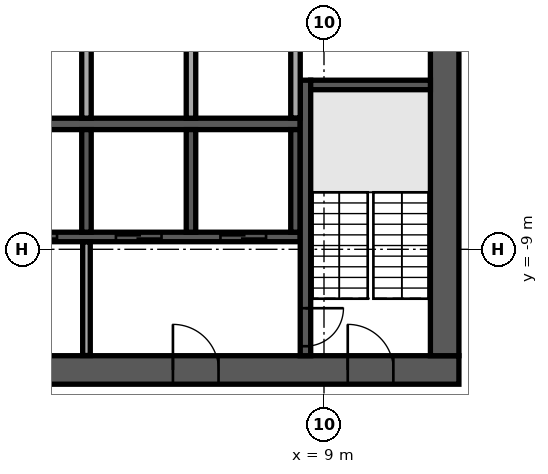
"""IFC4 building model, lengths in metres.
Left out: names, types, materials, properties, quantities, classifications, styles, units other than length and angle.
Written with IfcOpenShell. Run it as: python <this file> out.ifc"""

import sys

from ifc_helpers import new_model, si_unit, direction, frame, frame_2d, origin, place, context, subcontext, project, spatial, rectangle, extrude, element, fill, save


model = new_model("IFC4")
c1 = context("Model", 3, precision=1e-05, world=origin(), true_north=direction((0.0, 1.0)))
c2 = subcontext(c1, "Body", "Model", "MODEL_VIEW")
j1 = project(units=[si_unit("LENGTHUNIT", "METRE"), si_unit("PLANEANGLEUNIT", "RADIAN")], contexts=[c1])
p1 = place(None, origin())
s1 = spatial("IfcSite", under=j1, at=p1, CompositionType="ELEMENT")
p2 = place(p1, origin())
s2 = spatial("IfcBuilding", under=s1, at=p2, CompositionType="ELEMENT")
p3 = place(p2, frame((0.0, 0.0, 254.9)))
s3 = spatial("IfcBuildingStorey", under=s2, at=p3, CompositionType="ELEMENT", Elevation=254.9)
p4 = place(p3, frame((-12.55, -12.175, 0.0), z_axis=(0.0, 0.0, 1.0), x_axis=(1.0, 0.0, 0.0)))
e1 = element("IfcWall", 1, at=p4, inside=s3, PredefinedType="SHEAR", context=c2, shape_type="SweptSolid", body=[
    extrude(rectangle(XDim=25.1, YDim=0.75, at=frame_2d((12.55, 0.0))), origin(), (0.0, 0.0, 1.0), 3.64),
])
p5 = place(p4, frame((7.45, 0.0, 0.0)))
e2 = element("IfcOpeningElement", 2, at=p5, cuts=e1, PredefinedType="OPENING", context=c2, shape_type="SweptSolid", body=[
    extrude(rectangle(XDim=2.0, YDim=2.1, at=frame_2d((1.0, 1.05))), frame((0.0, 0.385, 0.0), z_axis=(0.0, -1.0, 0.0), x_axis=(1.0, 0.0, 0.0)), (0.0, 0.0, 1.0), 0.77),
])
p6 = place(p4, frame((17.575, 0.0, 0.0)))
e3 = element("IfcOpeningElement", 3, at=p6, cuts=e1, PredefinedType="OPENING", context=c2, shape_type="SweptSolid", body=[
    extrude(rectangle(XDim=1.2, YDim=2.1, at=frame_2d((0.6, 1.05))), frame((0.0, 0.385, 0.0), z_axis=(0.0, -1.0, 0.0), x_axis=(1.0, 0.0, 0.0)), (0.0, 0.0, 1.0), 0.77),
])
p7 = place(p4, frame((1.725, 0.0, 0.0)))
e4 = element("IfcOpeningElement", 4, at=p7, cuts=e1, PredefinedType="OPENING", context=c2, shape_type="SweptSolid", body=[
    extrude(rectangle(XDim=1.2, YDim=2.1, at=frame_2d((0.6, 1.05))), frame((0.0, 0.385, 0.0), z_axis=(0.0, -1.0, 0.0), x_axis=(1.0, 0.0, 0.0)), (0.0, 0.0, 1.0), 0.77),
])
p8 = place(p4, frame((22.175, 0.0, 0.0)))
e5 = element("IfcOpeningElement", 5, at=p8, cuts=e1, PredefinedType="OPENING", context=c2, shape_type="SweptSolid", body=[
    extrude(rectangle(XDim=1.2, YDim=2.1, at=frame_2d((0.6, 1.05))), frame((0.0, 0.385, 0.0), z_axis=(0.0, -1.0, 0.0), x_axis=(1.0, 0.0, 0.0)), (0.0, 0.0, 1.0), 0.77),
])
p9 = place(p3, frame((12.175, -11.8, 0.0), z_axis=(0.0, 0.0, 1.0), x_axis=(0.0, 1.0, 0.0)))
e6 = element("IfcWall", 6, at=p9, inside=s3, PredefinedType="SHEAR", context=c2, shape_type="SweptSolid", body=[
    extrude(rectangle(XDim=23.6, YDim=0.75, at=frame_2d((11.8, 0.0))), origin(), (0.0, 0.0, 1.0), 3.64),
])
p10 = place(p9, frame((10.6, 0.0, 0.0)))
e7 = element("IfcOpeningElement", 7, at=p10, cuts=e6, PredefinedType="OPENING", context=c2, shape_type="SweptSolid", body=[
    extrude(rectangle(XDim=2.4, YDim=2.4, at=frame_2d((1.2, 1.2))), frame((0.0, 0.385, 0.0), z_axis=(0.0, -1.0, 0.0), x_axis=(1.0, 0.0, 0.0)), (0.0, 0.0, 1.0), 0.77),
])
p11 = place(p3, frame((-2.875, -5.7, 0.0), z_axis=(0.0, 0.0, 1.0), x_axis=(1.0, 0.0, 0.0)))
e8 = element("IfcWall", 8, at=p11, inside=s3, PredefinedType="SOLIDWALL", context=c2, shape_type="SweptSolid", body=[
    extrude(rectangle(XDim=11.25, YDim=0.3, at=frame_2d((5.625, 0.0))), origin(), (0.0, 0.0, 1.0), 3.64),
])
for number, where, z_axis, x_axis in (
    (9, (2.75, -5.55, 0.0), (0.0, 0.0, 1.0), (0.0, 1.0, 0.0)),
    (10, (5.5, -5.55, 0.0), (0.0, 0.0, 1.0), (0.0, 1.0, 0.0)),
):
    element("IfcWall", number, at=place(p3, frame(where, z_axis=z_axis, x_axis=x_axis)), inside=s3, PredefinedType="SOLIDWALL", context=c2, shape_type="SweptSolid", body=[
        extrude(rectangle(XDim=2.7, YDim=0.25, at=frame_2d((1.35, 0.0))), origin(), (0.0, 0.0, 1.0), 3.64),
    ])
p12 = place(p3, frame((-2.875, -8.675, 0.0), z_axis=(0.0, 0.0, 1.0), x_axis=(1.0, 0.0, 0.0)))
e11 = element("IfcWall", 11, at=p12, inside=s3, PredefinedType="SOLIDWALL", context=c2, shape_type="SweptSolid", body=[
    extrude(rectangle(XDim=11.25, YDim=0.25, at=frame_2d((5.625, 0.0))), origin(), (0.0, 0.0, 1.0), 3.64),
])
p13 = place(p12, frame((0.9, 0.0, 0.0)))
e12 = element("IfcOpeningElement", 12, at=p13, cuts=e11, PredefinedType="OPENING", context=c2, shape_type="SweptSolid", body=[
    extrude(rectangle(XDim=1.2, YDim=2.1, at=frame_2d((0.6, 1.05))), frame((0.0, 0.135, 0.0), z_axis=(0.0, -1.0, 0.0), x_axis=(1.0, 0.0, 0.0)), (0.0, 0.0, 1.0), 0.27),
])
p14 = place(p12, frame((3.65, 0.0, 0.0)))
e13 = element("IfcOpeningElement", 13, at=p14, cuts=e11, PredefinedType="OPENING", context=c2, shape_type="SweptSolid", body=[
    extrude(rectangle(XDim=1.2, YDim=2.1, at=frame_2d((0.6, 1.05))), frame((0.0, 0.135, 0.0), z_axis=(0.0, -1.0, 0.0), x_axis=(1.0, 0.0, 0.0)), (0.0, 0.0, 1.0), 0.27),
])
p15 = place(p12, frame((6.4, 0.0, 0.0)))
e14 = element("IfcOpeningElement", 14, at=p15, cuts=e11, PredefinedType="OPENING", context=c2, shape_type="SweptSolid", body=[
    extrude(rectangle(XDim=1.2, YDim=2.1, at=frame_2d((0.6, 1.05))), frame((0.0, 0.135, 0.0), z_axis=(0.0, -1.0, 0.0), x_axis=(1.0, 0.0, 0.0)), (0.0, 0.0, 1.0), 0.27),
])
p16 = place(p12, frame((9.15, 0.0, 0.0)))
e15 = element("IfcOpeningElement", 15, at=p16, cuts=e11, PredefinedType="OPENING", context=c2, shape_type="SweptSolid", body=[
    extrude(rectangle(XDim=1.2, YDim=2.1, at=frame_2d((0.6, 1.05))), frame((0.0, 0.135, 0.0), z_axis=(0.0, -1.0, 0.0), x_axis=(1.0, 0.0, 0.0)), (0.0, 0.0, 1.0), 0.27),
])
for number, where, z_axis, x_axis in (
    (16, (2.75, -8.55, 0.0), (0.0, 0.0, 1.0), (0.0, 1.0, 0.0)),
    (17, (5.5, -8.55, 0.0), (0.0, 0.0, 1.0), (0.0, 1.0, 0.0)),
    (18, (8.25, -8.55, 0.0), (0.0, 0.0, 1.0), (0.0, 1.0, 0.0)),
):
    element("IfcWall", number, at=place(p3, frame(where, z_axis=z_axis, x_axis=x_axis)), inside=s3, PredefinedType="SOLIDWALL", context=c2, shape_type="SweptSolid", body=[
        extrude(rectangle(XDim=2.7, YDim=0.25, at=frame_2d((1.35, 0.0))), origin(), (0.0, 0.0, 1.0), 3.64),
    ])
p17 = place(p3, frame((8.512, -4.55, 0.0), z_axis=(0.0, 0.0, 1.0), x_axis=(0.0, -1.0, 0.0)))
e19 = element("IfcWall", 19, at=p17, inside=s3, PredefinedType="SOLIDWALL", context=c2, shape_type="SweptSolid", body=[
    extrude(rectangle(XDim=7.25, YDim=0.275, at=frame_2d((3.625, 0.0))), origin(), (0.0, 0.0, 1.0), 3.64),
])
p18 = place(p17, frame((6.0, 0.0, 0.0)))
e20 = element("IfcOpeningElement", 20, at=p18, cuts=e19, PredefinedType="OPENING", context=c2, shape_type="SweptSolid", body=[
    extrude(rectangle(XDim=1.0, YDim=2.1, at=frame_2d((0.5, 1.05))), frame((0.0, 0.147, 0.0), z_axis=(0.0, -1.0, 0.0), x_axis=(1.0, 0.0, 0.0)), (0.0, 0.0, 1.0), 0.295),
])
p19 = place(p3, frame((8.65, -4.675, 0.0), z_axis=(0.0, 0.0, 1.0), x_axis=(1.0, 0.0, 0.0)))
e21 = element("IfcWall", 21, at=p19, inside=s3, PredefinedType="SOLIDWALL", context=c2, shape_type="SweptSolid", body=[
    extrude(rectangle(XDim=3.15, YDim=0.25, at=frame_2d((1.575, 0.0))), origin(), (0.0, 0.0, 1.0), 3.64),
])
p20 = place(p3, frame((2.75, -11.795, 0.0), z_axis=(0.0, 0.0, 1.0), x_axis=(0.0, 1.0, 0.0)))
e22 = element("IfcWall", 22, at=p20, inside=s3, PredefinedType="PARTITIONING", context=c2, shape_type="SweptSolid", body=[
    extrude(rectangle(XDim=2.99, YDim=0.2, at=frame_2d((1.495, 0.0))), origin(), (0.0, 0.0, 1.0), 3.64),
])
p21 = place(p3, frame((8.25, -5.545, 0.0), z_axis=(0.0, 0.0, 1.0), x_axis=(0.0, 1.0, 0.0)))
e23 = element("IfcWall", 23, at=p21, inside=s3, PredefinedType="PARTITIONING", context=c2, shape_type="SweptSolid", body=[
    extrude(rectangle(XDim=2.69, YDim=0.25, at=frame_2d((1.345, 0.0))), origin(), (0.0, 0.0, 1.0), 3.64),
])
p22 = place(p3, frame((6.367, -33.16, 0.0), z_axis=(0.0, 0.0, 1.0), x_axis=(0.544637371147, 0.838671648472, 0.0)))
e24 = element("IfcWall", 24, at=p22, inside=s3, PredefinedType="STANDARD", context=c2, shape_type="SweptSolid", body=[
    extrude(rectangle(XDim=48.686, YDim=0.6, at=frame_2d((24.343, 0.0))), origin(), (0.0, 0.0, 1.0), 3.64),
])
p23 = place(p22, frame((1.213, 0.0, 0.9)))
e25 = element("IfcOpeningElement", 25, at=p23, cuts=e24, PredefinedType="OPENING", context=c2, shape_type="SweptSolid", body=[
    extrude(rectangle(XDim=2.0, YDim=2.1, at=frame_2d((1.0, 1.05))), frame((0.0, 0.31, 0.0), z_axis=(0.0, -1.0, 0.0), x_axis=(1.0, 0.0, 0.0)), (0.0, 0.0, 1.0), 0.62),
])
p24 = place(p22, frame((5.639, 0.0, 0.9)))
e26 = element("IfcOpeningElement", 26, at=p24, cuts=e24, PredefinedType="OPENING", context=c2, shape_type="SweptSolid", body=[
    extrude(rectangle(XDim=2.0, YDim=2.1, at=frame_2d((1.0, 1.05))), frame((0.0, 0.31, 0.0), z_axis=(0.0, -1.0, 0.0), x_axis=(1.0, 0.0, 0.0)), (0.0, 0.0, 1.0), 0.62),
])
p25 = place(p22, frame((14.491, 0.0, 0.9)))
e27 = element("IfcOpeningElement", 27, at=p25, cuts=e24, PredefinedType="OPENING", context=c2, shape_type="SweptSolid", body=[
    extrude(rectangle(XDim=2.0, YDim=2.1, at=frame_2d((1.0, 1.05))), frame((0.0, 0.31, 0.0), z_axis=(0.0, -1.0, 0.0), x_axis=(1.0, 0.0, 0.0)), (0.0, 0.0, 1.0), 0.62),
])
p26 = place(p22, frame((18.917, 0.0, 0.9)))
e28 = element("IfcOpeningElement", 28, at=p26, cuts=e24, PredefinedType="OPENING", context=c2, shape_type="SweptSolid", body=[
    extrude(rectangle(XDim=2.0, YDim=2.1, at=frame_2d((1.0, 1.05))), frame((0.0, 0.31, 0.0), z_axis=(0.0, -1.0, 0.0), x_axis=(1.0, 0.0, 0.0)), (0.0, 0.0, 1.0), 0.62),
])
p27 = place(p22, frame((23.343, 0.0, 0.9)))
e29 = element("IfcOpeningElement", 29, at=p27, cuts=e24, PredefinedType="OPENING", context=c2, shape_type="SweptSolid", body=[
    extrude(rectangle(XDim=2.0, YDim=2.1, at=frame_2d((1.0, 1.05))), frame((0.0, 0.31, 0.0), z_axis=(0.0, -1.0, 0.0), x_axis=(1.0, 0.0, 0.0)), (0.0, 0.0, 1.0), 0.62),
])
p28 = place(p22, frame((27.769, 0.0, 0.9)))
e30 = element("IfcOpeningElement", 30, at=p28, cuts=e24, PredefinedType="OPENING", context=c2, shape_type="SweptSolid", body=[
    extrude(rectangle(XDim=2.0, YDim=2.1, at=frame_2d((1.0, 1.05))), frame((0.0, 0.31, 0.0), z_axis=(0.0, -1.0, 0.0), x_axis=(1.0, 0.0, 0.0)), (0.0, 0.0, 1.0), 0.62),
])
p29 = place(p22, frame((32.195, 0.0, 0.9)))
e31 = element("IfcOpeningElement", 31, at=p29, cuts=e24, PredefinedType="OPENING", context=c2, shape_type="SweptSolid", body=[
    extrude(rectangle(XDim=2.0, YDim=2.1, at=frame_2d((1.0, 1.05))), frame((0.0, 0.31, 0.0), z_axis=(0.0, -1.0, 0.0), x_axis=(1.0, 0.0, 0.0)), (0.0, 0.0, 1.0), 0.62),
])
p30 = place(p22, frame((36.621, 0.0, 0.9)))
e32 = element("IfcOpeningElement", 32, at=p30, cuts=e24, PredefinedType="OPENING", context=c2, shape_type="SweptSolid", body=[
    extrude(rectangle(XDim=2.0, YDim=2.1, at=frame_2d((1.0, 1.05))), frame((0.0, 0.31, 0.0), z_axis=(0.0, -1.0, 0.0), x_axis=(1.0, 0.0, 0.0)), (0.0, 0.0, 1.0), 0.62),
])
p31 = place(p22, frame((41.047, 0.0, 0.9)))
e33 = element("IfcOpeningElement", 33, at=p31, cuts=e24, PredefinedType="OPENING", context=c2, shape_type="SweptSolid", body=[
    extrude(rectangle(XDim=2.0, YDim=2.1, at=frame_2d((1.0, 1.05))), frame((0.0, 0.31, 0.0), z_axis=(0.0, -1.0, 0.0), x_axis=(1.0, 0.0, 0.0)), (0.0, 0.0, 1.0), 0.62),
])
p32 = place(p22, frame((45.473, 0.0, 0.9)))
e34 = element("IfcOpeningElement", 34, at=p32, cuts=e24, PredefinedType="OPENING", context=c2, shape_type="SweptSolid", body=[
    extrude(rectangle(XDim=2.0, YDim=2.1, at=frame_2d((1.0, 1.05))), frame((0.0, 0.31, 0.0), z_axis=(0.0, -1.0, 0.0), x_axis=(1.0, 0.0, 0.0)), (0.0, 0.0, 1.0), 0.62),
])
p33 = place(p3, frame((-26.791, -5.221, 0.0), z_axis=(0.0, 0.0, 1.0), x_axis=(0.838671905754, -0.544636974965, 0.0)))
e35 = element("IfcWall", 35, at=p33, inside=s3, PredefinedType="PARTITIONING", context=c2, shape_type="SweptSolid", body=[
    extrude(rectangle(XDim=39.325, YDim=0.15, at=frame_2d((19.663, 0.0))), origin(), (0.0, 0.0, 1.0), 3.04),
])
p34 = place(p33, frame((2.05, 0.0, 0.0)))
e36 = element("IfcOpeningElement", 36, at=p34, cuts=e35, PredefinedType="OPENING", context=c2, shape_type="SweptSolid", body=[
    extrude(rectangle(XDim=1.0, YDim=2.1, at=frame_2d((0.5, 1.05))), frame((0.0, 0.085, 0.0), z_axis=(0.0, -1.0, 0.0), x_axis=(1.0, 0.0, 0.0)), (0.0, 0.0, 1.0), 0.17),
])
p35 = place(p33, frame((9.807, 0.0, 0.0)))
e37 = element("IfcOpeningElement", 37, at=p35, cuts=e35, PredefinedType="OPENING", context=c2, shape_type="SweptSolid", body=[
    extrude(rectangle(XDim=1.0, YDim=2.1, at=frame_2d((0.5, 1.05))), frame((0.0, 0.085, 0.0), z_axis=(0.0, -1.0, 0.0), x_axis=(1.0, 0.0, 0.0)), (0.0, 0.0, 1.0), 0.17),
])
p36 = place(p33, frame((18.866, 0.0, 0.0)))
e38 = element("IfcOpeningElement", 38, at=p36, cuts=e35, PredefinedType="OPENING", context=c2, shape_type="SweptSolid", body=[
    extrude(rectangle(XDim=1.0, YDim=2.1, at=frame_2d((0.5, 1.05))), frame((0.0, 0.085, 0.0), z_axis=(0.0, -1.0, 0.0), x_axis=(1.0, 0.0, 0.0)), (0.0, 0.0, 1.0), 0.17),
])
p37 = place(p33, frame((25.009, 0.0, 0.0)))
e39 = element("IfcOpeningElement", 39, at=p37, cuts=e35, PredefinedType="OPENING", context=c2, shape_type="SweptSolid", body=[
    extrude(rectangle(XDim=1.0, YDim=2.1, at=frame_2d((0.5, 1.05))), frame((0.0, 0.085, 0.0), z_axis=(0.0, -1.0, 0.0), x_axis=(1.0, 0.0, 0.0)), (0.0, 0.0, 1.0), 0.17),
])
p38 = place(p33, frame((36.069, 0.0, 0.0)))
e40 = element("IfcOpeningElement", 40, at=p38, cuts=e35, PredefinedType="OPENING", context=c2, shape_type="SweptSolid", body=[
    extrude(rectangle(XDim=1.8, YDim=2.1, at=frame_2d((0.9, 1.05))), frame((0.0, 0.085, 0.0), z_axis=(0.0, -1.0, 0.0), x_axis=(1.0, 0.0, 0.0)), (0.0, 0.0, 1.0), 0.17),
])
p39 = place(p6, origin())
e41 = element("IfcDoor", 41, at=p39, inside=s3, OperationType="SINGLE_SWING_LEFT", PredefinedType="DOOR", context=c2, shape_type="SweptSolid", body=[
    extrude(rectangle(XDim=1.2, YDim=2.1, at=frame_2d((0.6, 1.05))), frame((0.0, 0.025, 0.0), z_axis=(0.0, -1.0, 0.0), x_axis=(1.0, 0.0, 0.0)), (0.0, 0.0, 1.0), 0.05),
])
fill(e3, e41)
p40 = place(p8, origin())
e42 = element("IfcDoor", 42, at=p40, inside=s3, OperationType="SINGLE_SWING_LEFT", PredefinedType="DOOR", context=c2, shape_type="SweptSolid", body=[
    extrude(rectangle(XDim=1.2, YDim=2.1, at=frame_2d((0.6, 1.05))), frame((0.0, 0.025, 0.0), z_axis=(0.0, -1.0, 0.0), x_axis=(1.0, 0.0, 0.0)), (0.0, 0.0, 1.0), 0.05),
])
fill(e5, e42)
p41 = place(p14, origin())
e43 = element("IfcDoor", 43, at=p41, inside=s3, OperationType="DOUBLE_DOOR_SLIDING", PredefinedType="DOOR", context=c2, shape_type="SweptSolid", body=[
    extrude(rectangle(XDim=1.2, YDim=2.1, at=frame_2d((0.6, 1.05))), frame((0.0, 0.025, 0.0), z_axis=(0.0, -1.0, 0.0), x_axis=(1.0, 0.0, 0.0)), (0.0, 0.0, 1.0), 0.05),
])
fill(e13, e43)
p42 = place(p15, origin())
e44 = element("IfcDoor", 44, at=p42, inside=s3, OperationType="DOUBLE_DOOR_SLIDING", PredefinedType="DOOR", context=c2, shape_type="SweptSolid", body=[
    extrude(rectangle(XDim=1.2, YDim=2.1, at=frame_2d((0.6, 1.05))), frame((0.0, 0.025, 0.0), z_axis=(0.0, -1.0, 0.0), x_axis=(1.0, 0.0, 0.0)), (0.0, 0.0, 1.0), 0.05),
])
fill(e14, e44)
p43 = place(p16, origin())
e45 = element("IfcDoor", 45, at=p43, inside=s3, OperationType="DOUBLE_DOOR_SLIDING", PredefinedType="DOOR", context=c2, shape_type="SweptSolid", body=[
    extrude(rectangle(XDim=1.2, YDim=2.1, at=frame_2d((0.6, 1.05))), frame((0.0, 0.025, 0.0), z_axis=(0.0, -1.0, 0.0), x_axis=(1.0, 0.0, 0.0)), (0.0, 0.0, 1.0), 0.05),
])
fill(e15, e45)
p44 = place(p18, origin())
e46 = element("IfcDoor", 46, at=p44, inside=s3, OperationType="SINGLE_SWING_LEFT", PredefinedType="DOOR", context=c2, shape_type="SweptSolid", body=[
    extrude(rectangle(XDim=1.0, YDim=2.1, at=frame_2d((0.5, 1.05))), frame((0.0, 0.025, 0.0), z_axis=(0.0, -1.0, 0.0), x_axis=(1.0, 0.0, 0.0)), (0.0, 0.0, 1.0), 0.05),
])
fill(e20, e46)
save(model, sys.argv[1])
